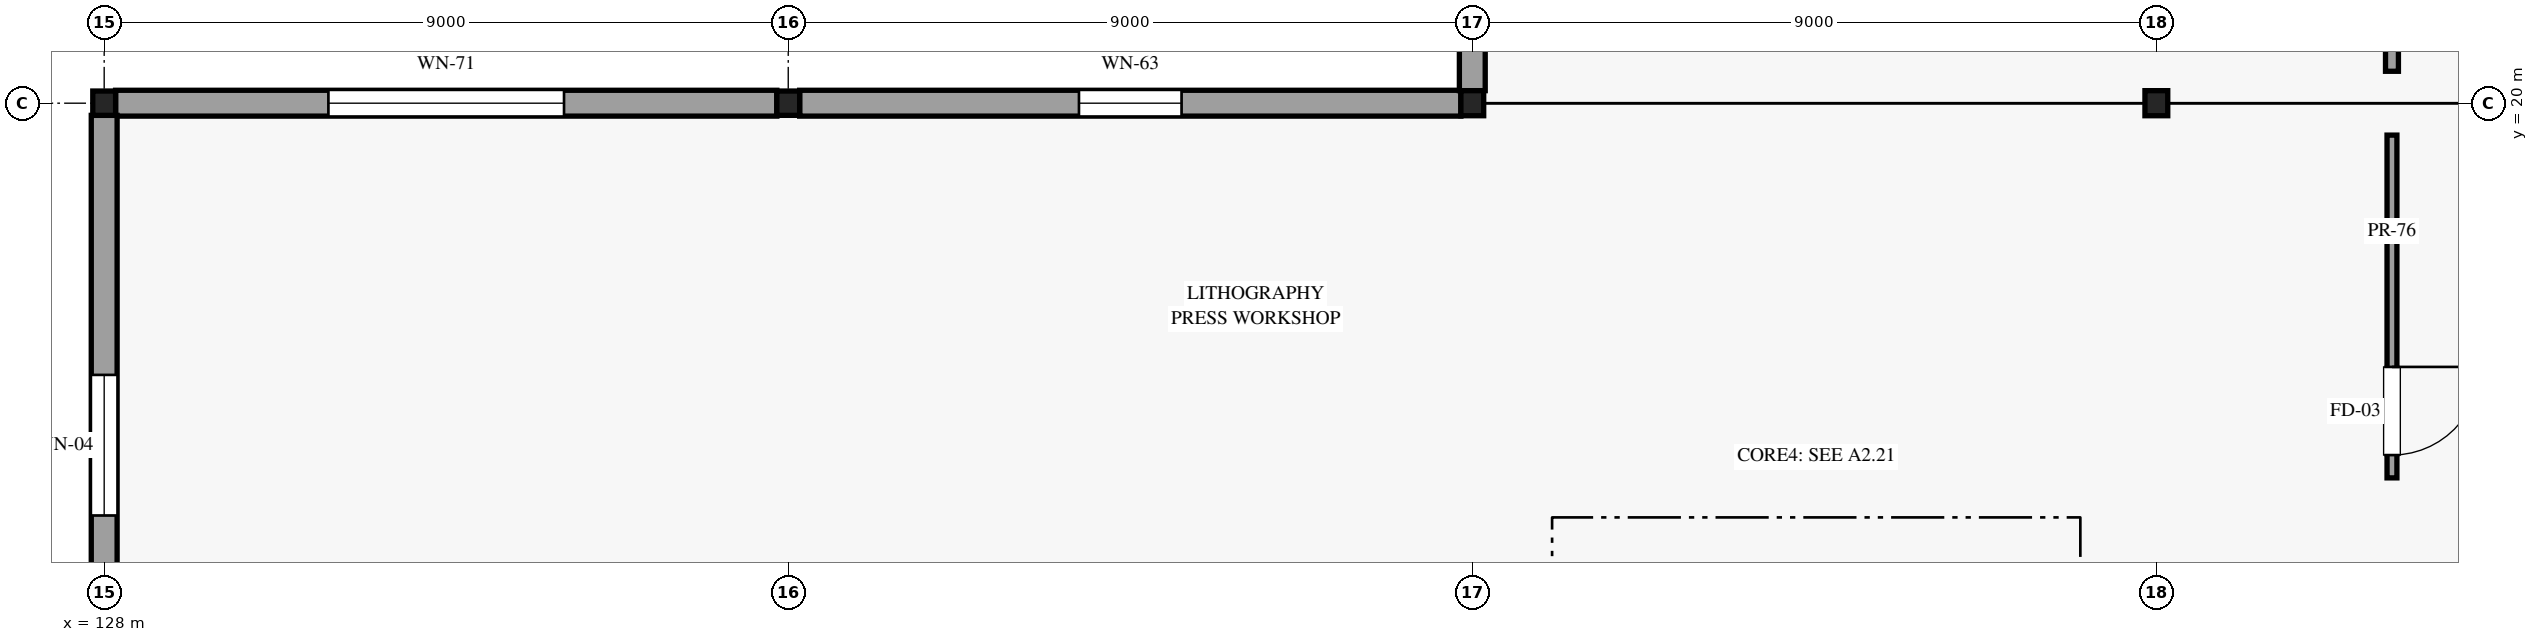
"""IFC4 building model, lengths in metres.
Left out: names, types, materials, properties, quantities, classifications, styles, units other than length and angle.
Written with IfcOpenShell. Run it as: python <this file> out.ifc"""

import sys

from ifc_helpers import new_model, si_unit, direction, frame, frame_2d, origin, origin_2d, place, context, subcontext, project, spatial, rectangle, i_section, extrude, element, fill, save


model = new_model("IFC4")
c1 = context("Model", 3, precision=1e-05, world=origin(), true_north=direction((0.0, 1.0)))
c2 = subcontext(c1, "Body", "Model", "MODEL_VIEW")
j1 = project(units=[si_unit("LENGTHUNIT", "METRE"), si_unit("PLANEANGLEUNIT", "RADIAN")], contexts=[c1])
p1 = place(None, origin())
s1 = spatial("IfcSite", under=j1, at=p1, CompositionType="ELEMENT")
p2 = place(p1, origin())
s2 = spatial("IfcBuilding", under=s1, at=p2, CompositionType="ELEMENT")
p3 = place(p2, frame((0.0, 0.0, 5.4)))
s3 = spatial("IfcBuildingStorey", under=s2, at=p3, CompositionType="ELEMENT", Elevation=5.4)
for number, where, z_axis, x_axis in (
    (1, (128.0, 20.0, 0.0), (0.0, 0.0, 1.0), (1.0, 0.0, 0.0)),
    (2, (137.0, 20.0, 0.0), (0.0, 0.0, 1.0), (1.0, 0.0, 0.0)),
):
    element("IfcColumn", number, at=place(p3, frame(where, z_axis=z_axis, x_axis=x_axis)), inside=s3, PredefinedType="COLUMN", context=c2, shape_type="SweptSolid", body=[
        extrude(i_section(OverallWidth=0.3, OverallDepth=0.32, WebThickness=0.011, FlangeThickness=0.021, FilletRadius=0.027, at=origin_2d()), origin(), (0.0, 0.0, 1.0), 4.8),
    ])
for number, where, z_axis, x_axis in (
    (3, (146.0, 20.0, 0.0), (0.0, 0.0, 1.0), (1.0, 0.0, 0.0)),
    (4, (155.0, 20.0, 0.0), (0.0, 0.0, 1.0), (1.0, 0.0, 0.0)),
):
    element("IfcColumn", number, at=place(p3, frame(where, z_axis=z_axis, x_axis=x_axis)), inside=s3, PredefinedType="COLUMN", context=c2, shape_type="SweptSolid", body=[
        extrude(i_section(OverallWidth=0.3, OverallDepth=0.33, WebThickness=0.01, FlangeThickness=0.017, FilletRadius=0.027, at=origin_2d()), origin(), (0.0, 0.0, 1.0), 4.8),
    ])
p4 = place(p3, frame((128.15, 20.0, 0.0), z_axis=(0.0, 0.0, 1.0), x_axis=(1.0, 0.0, 0.0)))
e5 = element("IfcWall", 5, at=p4, inside=s3, PredefinedType="STANDARD", context=c2, shape_type="SweptSolid", body=[
    extrude(rectangle(XDim=8.7, YDim=0.34, at=frame_2d((4.35, 0.0))), origin(), (0.0, 0.0, 1.0), 3.985),
])
p5 = place(p4, frame((2.8, 0.0, 0.85)))
e6 = element("IfcOpeningElement", 6, at=p5, cuts=e5, PredefinedType="OPENING", context=c2, shape_type="SweptSolid", body=[
    extrude(rectangle(XDim=3.1, YDim=2.3, at=frame_2d((1.55, 1.15))), frame((0.0, 0.18, 0.0), z_axis=(0.0, -1.0, 0.0), x_axis=(1.0, 0.0, 0.0)), (0.0, 0.0, 1.0), 0.36),
])
p6 = place(p3, frame((137.15, 20.0, 0.0), z_axis=(0.0, 0.0, 1.0), x_axis=(1.0, 0.0, 0.0)))
e7 = element("IfcWall", 7, at=p6, inside=s3, PredefinedType="STANDARD", context=c2, shape_type="SweptSolid", body=[
    extrude(rectangle(XDim=8.7, YDim=0.34, at=frame_2d((4.35, 0.0))), origin(), (0.0, 0.0, 1.0), 3.985),
])
p7 = place(p6, frame((3.675, 0.0, 0.85)))
e8 = element("IfcOpeningElement", 8, at=p7, cuts=e7, PredefinedType="OPENING", context=c2, shape_type="SweptSolid", body=[
    extrude(rectangle(XDim=1.35, YDim=1.75, at=frame_2d((0.675, 0.875))), frame((0.0, 0.18, 0.0), z_axis=(0.0, -1.0, 0.0), x_axis=(1.0, 0.0, 0.0)), (0.0, 0.0, 1.0), 0.36),
])
p8 = place(p3, frame((128.0, 11.16, 0.0), z_axis=(0.0, 0.0, 1.0), x_axis=(0.0, 1.0, 0.0)))
e9 = element("IfcWall", 9, at=p8, inside=s3, PredefinedType="STANDARD", context=c2, shape_type="SweptSolid", body=[
    extrude(rectangle(XDim=8.68, YDim=0.34, at=frame_2d((4.34, 0.0))), origin(), (0.0, 0.0, 1.0), 3.985),
])
p9 = place(p8, frame((3.415, 0.0, 0.85)))
e10 = element("IfcOpeningElement", 10, at=p9, cuts=e9, PredefinedType="OPENING", context=c2, shape_type="SweptSolid", body=[
    extrude(rectangle(XDim=1.85, YDim=2.1, at=frame_2d((0.925, 1.05))), frame((0.0, 0.18, 0.0), z_axis=(0.0, -1.0, 0.0), x_axis=(1.0, 0.0, 0.0)), (0.0, 0.0, 1.0), 0.36),
])
p10 = place(p3, frame((146.0, 20.165, 0.0), z_axis=(0.0, 0.0, 1.0), x_axis=(0.0, 1.0, 0.0)))
e11 = element("IfcWall", 11, at=p10, inside=s3, PredefinedType="STANDARD", context=c2, shape_type="SweptSolid", body=[
    extrude(rectangle(XDim=8.875, YDim=0.34, at=frame_2d((4.438, 0.0))), origin(), (0.0, 0.0, 1.0), 3.985),
])
p11 = place(p10, frame((3.312, 0.0, 0.85)))
e12 = element("IfcOpeningElement", 12, at=p11, cuts=e11, PredefinedType="OPENING", context=c2, shape_type="SweptSolid", body=[
    extrude(rectangle(XDim=2.25, YDim=2.3, at=frame_2d((1.125, 1.15))), frame((0.0, 0.18, 0.0), z_axis=(0.0, -1.0, 0.0), x_axis=(1.0, 0.0, 0.0)), (0.0, 0.0, 1.0), 0.36),
])
p12 = place(p3, frame((158.1, 15.07, 0.0), z_axis=(0.0, 0.0, 1.0), x_axis=(0.0, 1.0, 0.0)))
e13 = element("IfcWall", 13, at=p12, inside=s3, PredefinedType="PARTITIONING", context=c2, shape_type="SweptSolid", body=[
    extrude(rectangle(XDim=4.51, YDim=0.13, at=frame_2d((2.255, 0.0))), origin(), (0.0, 0.0, 1.0), 4.125),
])
p13 = place(p12, frame((1.46, 0.0, 0.0), z_axis=(0.0, 0.0, 1.0), x_axis=(-1.0, 0.0, 0.0)))
e14 = element("IfcOpeningElement", 14, at=p13, cuts=e13, PredefinedType="OPENING", context=c2, shape_type="SweptSolid", body=[
    extrude(rectangle(XDim=1.16, YDim=2.28, at=frame_2d((0.58, 1.14))), frame((0.0, 0.075, 0.0), z_axis=(0.0, -1.0, 0.0), x_axis=(1.0, 0.0, 0.0)), (0.0, 0.0, 1.0), 0.15),
])
p14 = place(p3, frame((158.1, 20.42, 0.0), z_axis=(0.0, 0.0, 1.0), x_axis=(0.0, 1.0, 0.0)))
e15 = element("IfcWall", 15, at=p14, inside=s3, PredefinedType="PARTITIONING", context=c2, shape_type="SweptSolid", body=[
    extrude(rectangle(XDim=17.76, YDim=0.17, at=frame_2d((8.88, 0.0))), origin(), (0.0, 0.0, 1.0), 3.985),
])
p15 = place(p14, frame((4.974, 0.0, 0.0), z_axis=(0.0, 0.0, 1.0), x_axis=(-1.0, 0.0, 0.0)))
e16 = element("IfcOpeningElement", 16, at=p15, cuts=e15, PredefinedType="OPENING", context=c2, shape_type="SweptSolid", body=[
    extrude(rectangle(XDim=1.24, YDim=2.32, at=frame_2d((0.62, 1.16))), frame((0.0, 0.095, 0.0), z_axis=(0.0, -1.0, 0.0), x_axis=(1.0, 0.0, 0.0)), (0.0, 0.0, 1.0), 0.19),
])
p16 = place(p5, origin())
e17 = element("IfcWindow", 17, at=p16, inside=s3, PartitioningType="SINGLE_PANEL", PredefinedType="WINDOW", context=c2, shape_type="SweptSolid", body=[
    extrude(rectangle(XDim=3.1, YDim=2.3, at=frame_2d((1.55, 1.15))), frame((0.0, 0.03, 0.0), z_axis=(0.0, -1.0, 0.0), x_axis=(1.0, 0.0, 0.0)), (0.0, 0.0, 1.0), 0.06),
])
fill(e6, e17)
p17 = place(p7, origin())
e18 = element("IfcWindow", 18, at=p17, inside=s3, PartitioningType="SINGLE_PANEL", PredefinedType="WINDOW", context=c2, shape_type="SweptSolid", body=[
    extrude(rectangle(XDim=1.35, YDim=1.75, at=frame_2d((0.675, 0.875))), frame((0.0, 0.03, 0.0), z_axis=(0.0, -1.0, 0.0), x_axis=(1.0, 0.0, 0.0)), (0.0, 0.0, 1.0), 0.06),
])
fill(e8, e18)
p18 = place(p9, origin())
e19 = element("IfcWindow", 19, at=p18, inside=s3, PartitioningType="SINGLE_PANEL", PredefinedType="WINDOW", context=c2, shape_type="SweptSolid", body=[
    extrude(rectangle(XDim=1.85, YDim=2.1, at=frame_2d((0.925, 1.05))), frame((0.0, 0.03, 0.0), z_axis=(0.0, -1.0, 0.0), x_axis=(1.0, 0.0, 0.0)), (0.0, 0.0, 1.0), 0.06),
])
fill(e10, e19)
p19 = place(p13, origin())
e20 = element("IfcDoor", 20, at=p19, inside=s3, OperationType="SINGLE_SWING_LEFT", PredefinedType="DOOR", context=c2, shape_type="SweptSolid", body=[
    extrude(rectangle(XDim=1.16, YDim=2.28, at=frame_2d((0.58, 1.14))), frame((0.0, 0.025, 0.0), z_axis=(0.0, -1.0, 0.0), x_axis=(1.0, 0.0, 0.0)), (0.0, 0.0, 1.0), 0.05),
])
fill(e14, e20)
save(model, sys.argv[1])
